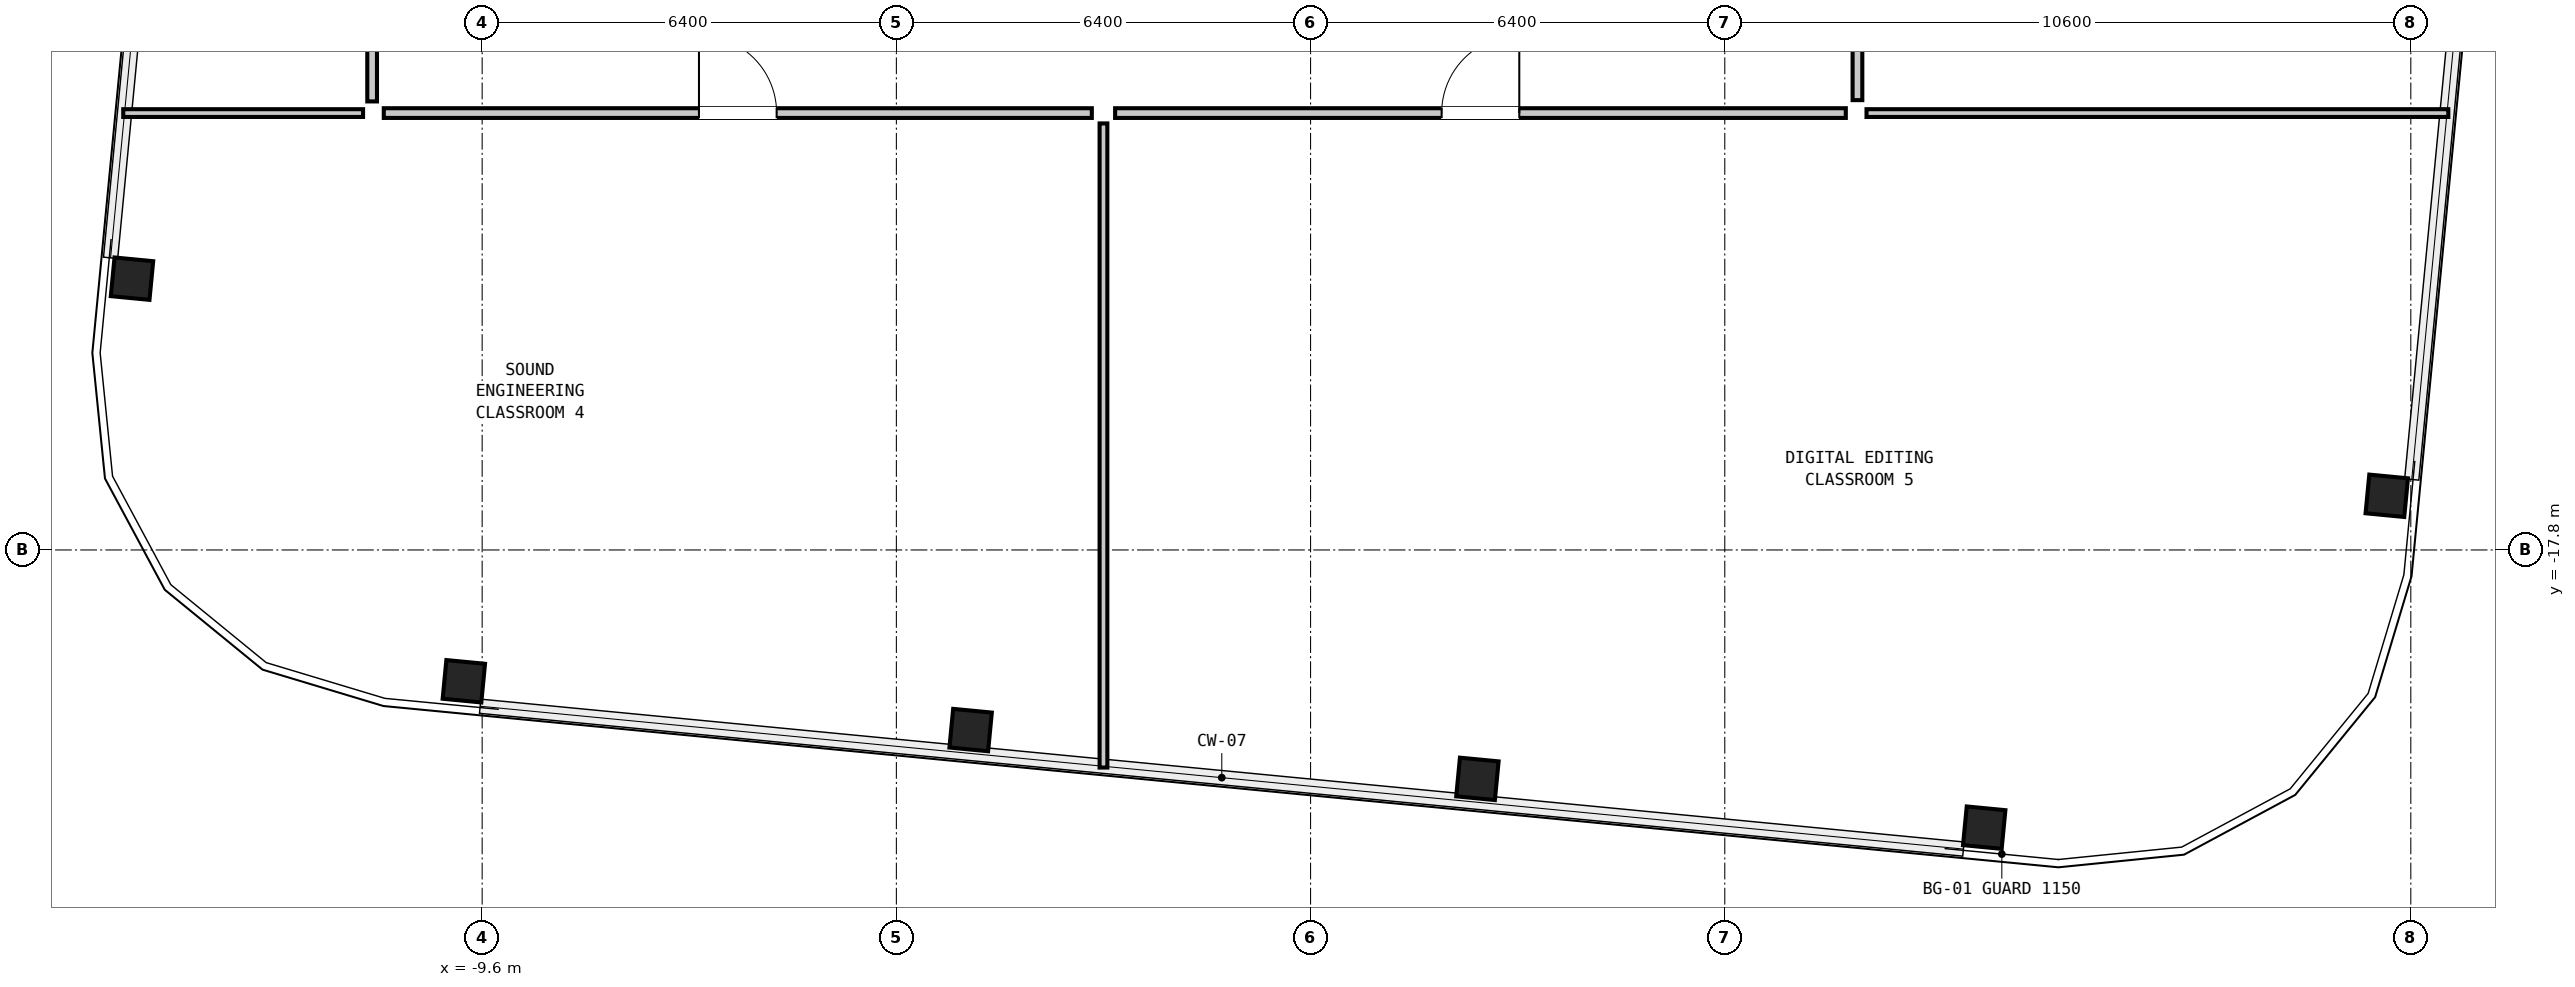
"""IFC4 building model, lengths in metres.
Left out: names, types, materials, properties, quantities, classifications, styles, units other than length and angle.
Written with IfcOpenShell. Run it as: python <this file> out.ifc"""

import sys

from ifc_helpers import new_model, si_unit, direction, frame, frame_2d, origin, origin_2d, place, context, subcontext, project, spatial, rectangle, hollow_rectangle, extrude, element, fill, save


model = new_model("IFC4")
c1 = context("Model", 3, precision=1e-05, world=origin(), true_north=direction((0.0, 1.0)))
c2 = subcontext(c1, "Body", "Model", "MODEL_VIEW")
j1 = project(units=[si_unit("LENGTHUNIT", "METRE"), si_unit("PLANEANGLEUNIT", "RADIAN")], contexts=[c1])
p1 = place(None, origin())
s1 = spatial("IfcSite", under=j1, at=p1, CompositionType="ELEMENT")
p2 = place(p1, origin())
s2 = spatial("IfcBuilding", under=s1, at=p2, CompositionType="ELEMENT")
p3 = place(p2, frame((0.0, 0.0, 270.3)))
s3 = spatial("IfcBuildingStorey", under=s2, at=p3, CompositionType="ELEMENT", Elevation=270.3)
for number, where, z_axis, x_axis in (
    (1, (-9.883, -19.829, 0.0), (0.0, 0.0, 1.0), (0.995, -0.096, 0.0)),
    (2, (-2.052, -20.583, 0.0), (0.0, 0.0, 1.0), (0.995, -0.096, 0.0)),
    (3, (5.778, -21.336, 0.0), (0.0, 0.0, 1.0), (0.995, -0.096, 0.0)),
    (4, (13.608, -22.09, 0.0), (0.0, 0.0, 1.0), (0.995, -0.096, 0.0)),
    (5, (19.829, -16.963, 0.0), (0.0, 0.0, 1.0), (0.096, 0.995, 0.0)),
    (6, (-15.01, -13.608, 0.0), (0.0, 0.0, 1.0), (0.096, 0.995, 0.0)),
):
    element("IfcColumn", number, at=place(p3, frame(where, z_axis=z_axis, x_axis=x_axis)), inside=s3, PredefinedType="COLUMN", context=c2, shape_type="SweptSolid", body=[
        extrude(hollow_rectangle(XDim=0.6, YDim=0.6, WallThickness=0.04, at=origin_2d()), origin(), (0.0, 0.0, 1.0), 3.05),
    ])
p4 = place(p3, frame((-15.146, -11.05, 0.0), z_axis=(0.0, 0.0, 1.0), x_axis=(1.0, 0.0, 0.0)))
e7 = element("IfcWall", 7, at=p4, inside=s3, PredefinedType="PARTITIONING", context=c2, shape_type="SweptSolid", body=[
    extrude(rectangle(XDim=3.706, YDim=0.12, at=frame_2d((1.853, 0.0))), origin(), (0.0, 0.0, 1.0), 2.86),
])
p5 = place(p3, frame((11.79, -11.05, 0.0), z_axis=(0.0, 0.0, 1.0), x_axis=(1.0, 0.0, 0.0)))
e8 = element("IfcWall", 8, at=p5, inside=s3, PredefinedType="PARTITIONING", context=c2, shape_type="SweptSolid", body=[
    extrude(rectangle(XDim=8.99, YDim=0.12, at=frame_2d((4.495, 0.0))), origin(), (0.0, 0.0, 1.0), 2.86),
])
p6 = place(p3, frame((0.0, -21.162, 0.0), z_axis=(0.0, 0.0, 1.0), x_axis=(0.0, 1.0, 0.0)))
e9 = element("IfcWall", 9, at=p6, inside=s3, PredefinedType="PARTITIONING", context=c2, shape_type="SweptSolid", body=[
    extrude(rectangle(XDim=9.952, YDim=0.12, at=frame_2d((4.976, 0.0))), origin(), (0.0, 0.0, 1.0), 2.381),
])
p7 = place(p3, frame((-11.12, -11.05, 0.0), z_axis=(0.0, 0.0, 1.0), x_axis=(1.0, 0.0, 0.0)))
e10 = element("IfcWall", 10, at=p7, inside=s3, PredefinedType="PARTITIONING", context=c2, shape_type="SweptSolid", body=[
    extrude(rectangle(XDim=10.94, YDim=0.15, at=frame_2d((5.47, 0.0))), origin(), (0.0, 0.0, 1.0), 2.86),
])
p8 = place(p7, frame((4.87, 0.0, 0.0)))
e11 = element("IfcOpeningElement", 11, at=p8, cuts=e10, PredefinedType="OPENING", context=c2, shape_type="SweptSolid", body=[
    extrude(rectangle(XDim=1.2, YDim=2.1, at=frame_2d((0.6, 1.05))), frame((0.0, 0.087, 0.0), z_axis=(0.0, -1.0, 0.0), x_axis=(1.0, 0.0, 0.0)), (0.0, 0.0, 1.0), 0.174),
])
p9 = place(p3, frame((0.18, -11.05, 0.0), z_axis=(0.0, 0.0, 1.0), x_axis=(1.0, 0.0, 0.0)))
e12 = element("IfcWall", 12, at=p9, inside=s3, PredefinedType="PARTITIONING", context=c2, shape_type="SweptSolid", body=[
    extrude(rectangle(XDim=11.29, YDim=0.15, at=frame_2d((5.645, 0.0))), origin(), (0.0, 0.0, 1.0), 2.86),
])
p10 = place(p9, frame((5.045, 0.0, 0.0)))
e13 = element("IfcOpeningElement", 13, at=p10, cuts=e12, PredefinedType="OPENING", context=c2, shape_type="SweptSolid", body=[
    extrude(rectangle(XDim=1.2, YDim=2.1, at=frame_2d((0.6, 1.05))), frame((0.0, 0.087, 0.0), z_axis=(0.0, -1.0, 0.0), x_axis=(1.0, 0.0, 0.0)), (0.0, 0.0, 1.0), 0.174),
])
p11 = place(p3, frame((-11.3, -0.18, 0.0), z_axis=(0.0, 0.0, 1.0), x_axis=(0.0, -1.0, 0.0)))
e14 = element("IfcWall", 14, at=p11, inside=s3, PredefinedType="PARTITIONING", context=c2, shape_type="SweptSolid", body=[
    extrude(rectangle(XDim=10.69, YDim=0.15, at=frame_2d((5.345, 0.0))), origin(), (0.0, 0.0, 1.0), 2.86),
])
p12 = place(p11, frame((4.745, 0.0, 0.0)))
e15 = element("IfcOpeningElement", 15, at=p12, cuts=e14, PredefinedType="OPENING", context=c2, shape_type="SweptSolid", body=[
    extrude(rectangle(XDim=1.2, YDim=2.1, at=frame_2d((0.6, 1.05))), frame((0.0, 0.087, 0.0), z_axis=(0.0, -1.0, 0.0), x_axis=(1.0, 0.0, 0.0)), (0.0, 0.0, 1.0), 0.174),
])
p13 = place(p3, frame((11.65, -10.85, 0.0), z_axis=(0.0, 0.0, 1.0), x_axis=(0.0, 1.0, 0.0)))
e16 = element("IfcWall", 16, at=p13, inside=s3, PredefinedType="PARTITIONING", context=c2, shape_type="SweptSolid", body=[
    extrude(rectangle(XDim=8.29, YDim=0.15, at=frame_2d((4.145, 0.0))), origin(), (0.0, 0.0, 1.0), 2.86),
])
p14 = place(p13, frame((3.67, 0.0, 0.0)))
e17 = element("IfcOpeningElement", 17, at=p14, cuts=e16, PredefinedType="OPENING", context=c2, shape_type="SweptSolid", body=[
    extrude(rectangle(XDim=0.95, YDim=2.1, at=frame_2d((0.475, 1.05))), frame((0.0, 0.087, 0.0), z_axis=(0.0, -1.0, 0.0), x_axis=(1.0, 0.0, 0.0)), (0.0, 0.0, 1.0), 0.174),
])
p15 = place(p8, origin())
e18 = element("IfcDoor", 18, at=p15, inside=s3, OperationType="SINGLE_SWING_LEFT", PredefinedType="DOOR", context=c2, shape_type="SweptSolid", body=[
    extrude(rectangle(XDim=1.2, YDim=2.1, at=frame_2d((0.6, 1.05))), frame((0.0, 0.025, 0.0), z_axis=(0.0, -1.0, 0.0), x_axis=(1.0, 0.0, 0.0)), (0.0, 0.0, 1.0), 0.05),
])
fill(e11, e18)
p16 = place(p10, origin())
e19 = element("IfcDoor", 19, at=p16, inside=s3, OperationType="SINGLE_SWING_RIGHT", PredefinedType="DOOR", context=c2, shape_type="SweptSolid", body=[
    extrude(rectangle(XDim=1.2, YDim=2.1, at=frame_2d((0.6, 1.05))), frame((0.0, 0.025, 0.0), z_axis=(0.0, -1.0, 0.0), x_axis=(1.0, 0.0, 0.0)), (0.0, 0.0, 1.0), 0.05),
])
fill(e13, e19)
save(model, sys.argv[1])
